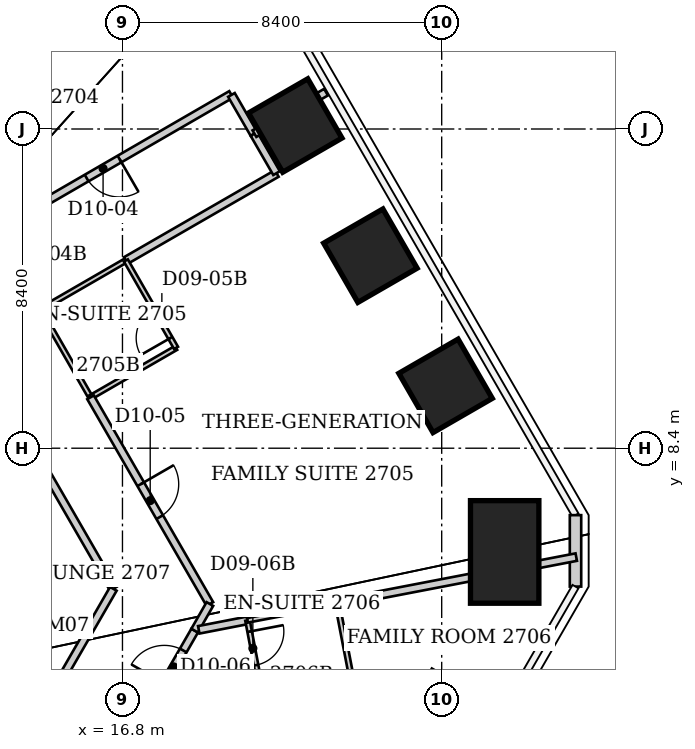
"""IFC4 building model, lengths in metres.
Left out: names, types, materials, properties, quantities, classifications, styles, units other than length and angle.
Written with IfcOpenShell. Run it as: python <this file> out.ifc"""

import sys

from ifc_helpers import new_model, si_unit, direction, frame, frame_2d, origin, origin_2d, place, context, subcontext, project, spatial, rectangle, extrude, element, fill, save


model = new_model("IFC4")
c1 = context("Model", 3, precision=1e-05, world=origin(), true_north=direction((0.0, 1.0)))
c2 = subcontext(c1, "Body", "Model", "MODEL_VIEW")
j1 = project(units=[si_unit("LENGTHUNIT", "METRE"), si_unit("PLANEANGLEUNIT", "RADIAN")], contexts=[c1])
p1 = place(None, origin())
s1 = spatial("IfcSite", under=j1, at=p1, CompositionType="ELEMENT")
p2 = place(p1, origin())
s2 = spatial("IfcBuilding", under=s1, at=p2, CompositionType="ELEMENT")
p3 = place(p2, frame((0.0, 0.0, 112.0)))
s3 = spatial("IfcBuildingStorey", under=s2, at=p3, CompositionType="ELEMENT", Elevation=112.0)
for number, where, z_axis, x_axis in (
    (1, (21.346, 16.891, 0.0), (0.0, 0.0, 1.0), (0.866, 0.5, 0.0)),
    (2, (23.324, 13.466, 0.0), (0.0, 0.0, 1.0), (0.866, 0.5, 0.0)),
    (3, (25.302, 10.041, 0.0), (0.0, 0.0, 1.0), (0.866, 0.5, 0.0)),
):
    element("IfcColumn", number, at=place(p3, frame(where, z_axis=z_axis, x_axis=x_axis)), inside=s3, PredefinedType="COLUMN", context=c2, shape_type="SweptSolid", body=[
        extrude(rectangle(XDim=1.8, YDim=1.8, at=origin_2d()), origin(), (0.0, 0.0, 1.0), 3.8),
    ])
p4 = place(p3, frame((26.857, 5.67, 0.0), z_axis=(0.0, 0.0, 1.0), x_axis=(1.0, 0.0, 0.0)))
e4 = element("IfcColumn", 4, at=p4, inside=s3, PredefinedType="COLUMN", context=c2, shape_type="SweptSolid", body=[
    extrude(rectangle(XDim=1.8, YDim=2.7, at=origin_2d()), origin(), (0.0, 0.0, 1.0), 3.8),
])
p5 = place(p3, frame((28.721, 6.638, 0.0), z_axis=(0.0, 0.0, 1.0), x_axis=(0.0, -1.0, 0.0)))
e5 = element("IfcWall", 5, at=p5, inside=s3, PredefinedType="SOLIDWALL", context=c2, shape_type="SweptSolid", body=[
    extrude(rectangle(XDim=1.88, YDim=0.3, at=frame_2d((0.94, 0.0))), origin(), (0.0, 0.0, 1.0), 3.64),
])
p6 = place(p3, frame((12.93, 10.99, 0.0), z_axis=(0.0, 0.0, 1.0), x_axis=(0.4998524389, -0.866110581465, 0.0)))
e6 = element("IfcWall", 6, at=p6, inside=s3, PredefinedType="PARTITIONING", context=c2, shape_type="SweptSolid", body=[
    extrude(rectangle(XDim=7.262, YDim=0.2, at=frame_2d((3.631, 0.0))), origin(), (0.0, 0.0, 1.0), 3.64),
])
p7 = place(p3, frame((14.64, 12.04, 0.0), z_axis=(0.0, 0.0, 1.0), x_axis=(0.497773911185, -0.867306827682, 0.0)))
e7 = element("IfcWall", 7, at=p7, inside=s3, PredefinedType="PARTITIONING", context=c2, shape_type="SweptSolid", body=[
    extrude(rectangle(XDim=2.652, YDim=0.12, at=frame_2d((1.326, 0.0))), origin(), (0.0, 0.0, 1.0), 3.64),
])
p8 = place(p3, frame((14.64, 12.04, 0.0), z_axis=(0.0, 0.0, 1.0), x_axis=(0.865880446098, 0.50025099007, 0.0)))
e8 = element("IfcWall", 8, at=p8, inside=s3, PredefinedType="PARTITIONING", context=c2, shape_type="SweptSolid", body=[
    extrude(rectangle(XDim=2.599, YDim=0.12, at=frame_2d((1.299, 0.0))), origin(), (0.0, 0.0, 1.0), 3.64),
])
p9 = place(p3, frame((15.96, 9.74, 0.0), z_axis=(0.0, 0.0, 1.0), x_axis=(0.865856933682, 0.500291685314, 0.0)))
e9 = element("IfcWall", 9, at=p9, inside=s3, PredefinedType="PARTITIONING", context=c2, shape_type="SweptSolid", body=[
    extrude(rectangle(XDim=2.599, YDim=0.12, at=frame_2d((1.299, 0.0))), origin(), (0.0, 0.0, 1.0), 3.64),
])
p10 = place(p3, frame((15.96, 9.74, 0.0), z_axis=(0.0, 0.0, 1.0), x_axis=(0.499926574701, -0.86606779175, 0.0)))
e10 = element("IfcWall", 10, at=p10, inside=s3, PredefinedType="PARTITIONING", context=c2, shape_type="SweptSolid", body=[
    extrude(rectangle(XDim=6.281, YDim=0.2, at=frame_2d((3.141, 0.0))), origin(), (0.0, 0.0, 1.0), 3.64),
])
p11 = place(p10, frame((2.641, 0.0, 0.0)))
e11 = element("IfcOpeningElement", 11, at=p11, cuts=e10, PredefinedType="OPENING", context=c2, shape_type="SweptSolid", body=[
    extrude(rectangle(XDim=1.0, YDim=2.13, at=frame_2d((0.5, 1.065))), frame((0.0, 0.1, 0.0), z_axis=(0.0, -1.0, 0.0), x_axis=(1.0, 0.0, 0.0)), (0.0, 0.0, 1.0), 0.2),
])
p12 = place(p3, frame((16.56, 4.7, 0.0), z_axis=(0.0, 0.0, 1.0), x_axis=(-0.499662169849, -0.866220362276, 0.0)))
e12 = element("IfcWall", 12, at=p12, inside=s3, PredefinedType="PARTITIONING", context=c2, shape_type="SweptSolid", body=[
    extrude(rectangle(XDim=9.466, YDim=0.2, at=frame_2d((4.733, 0.0))), origin(), (0.0, 0.0, 1.0), 3.64),
])
p13 = place(p12, frame((4.183, 0.0, 0.0)))
e13 = element("IfcOpeningElement", 13, at=p13, cuts=e12, PredefinedType="OPENING", context=c2, shape_type="SweptSolid", body=[
    extrude(rectangle(XDim=1.1, YDim=2.2, at=frame_2d((0.55, 1.1))), frame((0.0, 0.1, 0.0), z_axis=(0.0, -1.0, 0.0), x_axis=(1.0, 0.0, 0.0)), (0.0, 0.0, 1.0), 0.2),
])
p14 = place(p3, frame((16.89, 13.34, 0.0), z_axis=(0.0, 0.0, 1.0), x_axis=(0.86623967971, 0.499628679417, 0.0)))
e14 = element("IfcWall", 14, at=p14, inside=s3, PredefinedType="PARTITIONING", context=c2, shape_type="SweptSolid", body=[
    extrude(rectangle(XDim=4.583, YDim=0.2, at=frame_2d((2.292, 0.0))), origin(), (0.0, 0.0, 1.0), 3.64),
])
p15 = place(p3, frame((17.6, 1.69, 0.0), z_axis=(0.0, 0.0, 1.0), x_axis=(0.498987132006, 0.866609394187, 0.0)))
e15 = element("IfcWall", 15, at=p15, inside=s3, PredefinedType="PARTITIONING", context=c2, shape_type="SweptSolid", body=[
    extrude(rectangle(XDim=2.204, YDim=0.2, at=frame_2d((1.102, 0.0))), origin(), (0.0, 0.0, 1.0), 3.64),
])
p16 = place(p15, frame((0.602, 0.0, 0.0)))
e16 = element("IfcOpeningElement", 16, at=p16, cuts=e15, PredefinedType="OPENING", context=c2, shape_type="SweptSolid", body=[
    extrude(rectangle(XDim=1.0, YDim=2.13, at=frame_2d((0.5, 1.065))), frame((0.0, 0.1, 0.0), z_axis=(0.0, -1.0, 0.0), x_axis=(1.0, 0.0, 0.0)), (0.0, 0.0, 1.0), 0.2),
])
p17 = place(p3, frame((18.21, 11.04, 0.0), z_axis=(0.0, 0.0, 1.0), x_axis=(-0.497773911185, 0.867306827682, 0.0)))
e17 = element("IfcWall", 17, at=p17, inside=s3, PredefinedType="PARTITIONING", context=c2, shape_type="SweptSolid", body=[
    extrude(rectangle(XDim=2.652, YDim=0.12, at=frame_2d((1.326, 0.0))), origin(), (0.0, 0.0, 1.0), 3.64),
])
p18 = place(p17, frame((0.3, 0.0, 0.0)))
e18 = element("IfcOpeningElement", 18, at=p18, cuts=e17, PredefinedType="OPENING", context=c2, shape_type="SweptSolid", body=[
    extrude(rectangle(XDim=0.9, YDim=2.03, at=frame_2d((0.45, 1.015))), frame((0.0, 0.06, 0.0), z_axis=(0.0, -1.0, 0.0), x_axis=(1.0, 0.0, 0.0)), (0.0, 0.0, 1.0), 0.12),
])
p19 = place(p3, frame((18.7, 3.6, 0.0), z_axis=(0.0, 0.0, 1.0), x_axis=(0.496301979961, 0.868149955185, 0.0)))
e19 = element("IfcWall", 19, at=p19, inside=s3, PredefinedType="PARTITIONING", context=c2, shape_type="SweptSolid", body=[
    extrude(rectangle(XDim=0.806, YDim=0.2, at=frame_2d((0.403, 0.0))), origin(), (0.0, 0.0, 1.0), 3.64),
])
p20 = place(p3, frame((18.808, 3.621, 0.0), z_axis=(0.0, 0.0, 1.0), x_axis=(0.981658166981, 0.190649529764, 0.0)))
e20 = element("IfcWall", 20, at=p20, inside=s3, PredefinedType="PARTITIONING", context=c2, shape_type="SweptSolid", body=[
    extrude(rectangle(XDim=1.306, YDim=0.2, at=frame_2d((0.653, 0.0))), origin(), (0.0, 0.0, 1.0), 3.64),
])
p21 = place(p3, frame((19.66, 17.71, 0.0), z_axis=(0.0, 0.0, 1.0), x_axis=(-0.865548612503, -0.500824918902, 0.0)))
e21 = element("IfcWall", 21, at=p21, inside=s3, PredefinedType="PARTITIONING", context=c2, shape_type="SweptSolid", body=[
    extrude(rectangle(XDim=7.787, YDim=0.2, at=frame_2d((3.894, 0.0))), origin(), (0.0, 0.0, 1.0), 3.64),
])
p22 = place(p21, frame((3.394, 0.0, 0.0)))
e22 = element("IfcOpeningElement", 22, at=p22, cuts=e21, PredefinedType="OPENING", context=c2, shape_type="SweptSolid", body=[
    extrude(rectangle(XDim=1.0, YDim=2.13, at=frame_2d((0.5, 1.065))), frame((0.0, 0.1, 0.0), z_axis=(0.0, -1.0, 0.0), x_axis=(1.0, 0.0, 0.0)), (0.0, 0.0, 1.0), 0.2),
])
p23 = place(p3, frame((19.667, 17.697, 0.0), z_axis=(0.0, 0.0, 1.0), x_axis=(0.499704629046, -0.866195869137, 0.0)))
e23 = element("IfcWall", 23, at=p23, inside=s3, PredefinedType="PARTITIONING", context=c2, shape_type="SweptSolid", body=[
    extrude(rectangle(XDim=1.186, YDim=0.2, at=frame_2d((0.593, 0.0))), origin(), (0.0, 0.0, 1.0), 3.64),
])
p24 = place(p3, frame((20.09, 3.87, 0.0), z_axis=(0.0, 0.0, 1.0), x_axis=(0.187985762814, -0.982171753299, 0.0)))
e24 = element("IfcWall", 24, at=p24, inside=s3, PredefinedType="PARTITIONING", context=c2, shape_type="SweptSolid", body=[
    extrude(rectangle(XDim=2.606, YDim=0.12, at=frame_2d((1.303, 0.0))), origin(), (0.0, 0.0, 1.0), 3.64),
])
p25 = place(p24, frame((0.3, 0.0, 0.0)))
e25 = element("IfcOpeningElement", 25, at=p25, cuts=e24, PredefinedType="OPENING", context=c2, shape_type="SweptSolid", body=[
    extrude(rectangle(XDim=0.9, YDim=2.03, at=frame_2d((0.45, 1.015))), frame((0.0, 0.06, 0.0), z_axis=(0.0, -1.0, 0.0), x_axis=(1.0, 0.0, 0.0)), (0.0, 0.0, 1.0), 0.12),
])
p26 = place(p3, frame((20.09, 3.87, 0.0), z_axis=(0.0, 0.0, 1.0), x_axis=(0.982497428577, 0.18627614673, 0.0)))
e26 = element("IfcWall", 26, at=p26, inside=s3, PredefinedType="PARTITIONING", context=c2, shape_type="SweptSolid", body=[
    extrude(rectangle(XDim=2.402, YDim=0.12, at=frame_2d((1.201, 0.0))), origin(), (0.0, 0.0, 1.0), 3.64),
])
p27 = place(p3, frame((20.26, 16.67, 0.0), z_axis=(0.0, 0.0, 1.0), x_axis=(0.499734288277, -0.866178758179, 0.0)))
e27 = element("IfcWall", 27, at=p27, inside=s3, PredefinedType="PARTITIONING", context=c2, shape_type="SweptSolid", body=[
    extrude(rectangle(XDim=1.191, YDim=0.2, at=frame_2d((0.595, 0.0))), origin(), (0.0, 0.0, 1.0), 3.64),
])
p28 = place(p3, frame((22.156, 17.77, 0.0), z_axis=(0.0, 0.0, 1.0), x_axis=(-0.865037029405, -0.501708020425, 0.0)))
e28 = element("IfcWall", 28, at=p28, inside=s3, PredefinedType="PARTITIONING", context=c2, shape_type="SweptSolid", body=[
    extrude(rectangle(XDim=2.177, YDim=0.2, at=frame_2d((1.089, 0.0))), origin(), (0.0, 0.0, 1.0), 3.64),
])
p29 = place(p3, frame((22.449, 4.324, 0.0), z_axis=(0.0, 0.0, 1.0), x_axis=(0.981996388644, 0.188899689492, 0.0)))
e29 = element("IfcWall", 29, at=p29, inside=s3, PredefinedType="PARTITIONING", context=c2, shape_type="SweptSolid", body=[
    extrude(rectangle(XDim=6.406, YDim=0.2, at=frame_2d((3.203, 0.0))), origin(), (0.0, 0.0, 1.0), 3.64),
])
p30 = place(p3, frame((22.94, 1.77, 0.0), z_axis=(0.0, 0.0, 1.0), x_axis=(-0.188697442844, 0.982035271802, 0.0)))
e30 = element("IfcWall", 30, at=p30, inside=s3, PredefinedType="PARTITIONING", context=c2, shape_type="SweptSolid", body=[
    extrude(rectangle(XDim=2.597, YDim=0.12, at=frame_2d((1.298, 0.0))), origin(), (0.0, 0.0, 1.0), 3.64),
])
p31 = place(p22, origin())
e31 = element("IfcDoor", 31, at=p31, inside=s3, OperationType="SINGLE_SWING_LEFT", PredefinedType="DOOR", context=c2, shape_type="SweptSolid", body=[
    extrude(rectangle(XDim=1.0, YDim=2.13, at=frame_2d((0.5, 1.065))), frame((0.0, 0.025, 0.0), z_axis=(0.0, -1.0, 0.0), x_axis=(1.0, 0.0, 0.0)), (0.0, 0.0, 1.0), 0.05),
])
fill(e22, e31)
p32 = place(p11, origin())
e32 = element("IfcDoor", 32, at=p32, inside=s3, OperationType="SINGLE_SWING_LEFT", PredefinedType="DOOR", context=c2, shape_type="SweptSolid", body=[
    extrude(rectangle(XDim=1.0, YDim=2.13, at=frame_2d((0.5, 1.065))), frame((0.0, 0.025, 0.0), z_axis=(0.0, -1.0, 0.0), x_axis=(1.0, 0.0, 0.0)), (0.0, 0.0, 1.0), 0.05),
])
fill(e11, e32)
p33 = place(p18, origin())
e33 = element("IfcDoor", 33, at=p33, inside=s3, OperationType="SINGLE_SWING_LEFT", PredefinedType="DOOR", context=c2, shape_type="SweptSolid", body=[
    extrude(rectangle(XDim=0.9, YDim=2.03, at=frame_2d((0.45, 1.015))), frame((0.0, 0.025, 0.0), z_axis=(0.0, -1.0, 0.0), x_axis=(1.0, 0.0, 0.0)), (0.0, 0.0, 1.0), 0.05),
])
fill(e18, e33)
p34 = place(p16, origin())
e34 = element("IfcDoor", 34, at=p34, inside=s3, OperationType="SINGLE_SWING_LEFT", PredefinedType="DOOR", context=c2, shape_type="SweptSolid", body=[
    extrude(rectangle(XDim=1.0, YDim=2.13, at=frame_2d((0.5, 1.065))), frame((0.0, 0.025, 0.0), z_axis=(0.0, -1.0, 0.0), x_axis=(1.0, 0.0, 0.0)), (0.0, 0.0, 1.0), 0.05),
])
fill(e16, e34)
p35 = place(p25, origin())
e35 = element("IfcDoor", 35, at=p35, inside=s3, OperationType="SINGLE_SWING_LEFT", PredefinedType="DOOR", context=c2, shape_type="SweptSolid", body=[
    extrude(rectangle(XDim=0.9, YDim=2.03, at=frame_2d((0.45, 1.015))), frame((0.0, 0.025, 0.0), z_axis=(0.0, -1.0, 0.0), x_axis=(1.0, 0.0, 0.0)), (0.0, 0.0, 1.0), 0.05),
])
fill(e25, e35)
save(model, sys.argv[1])
